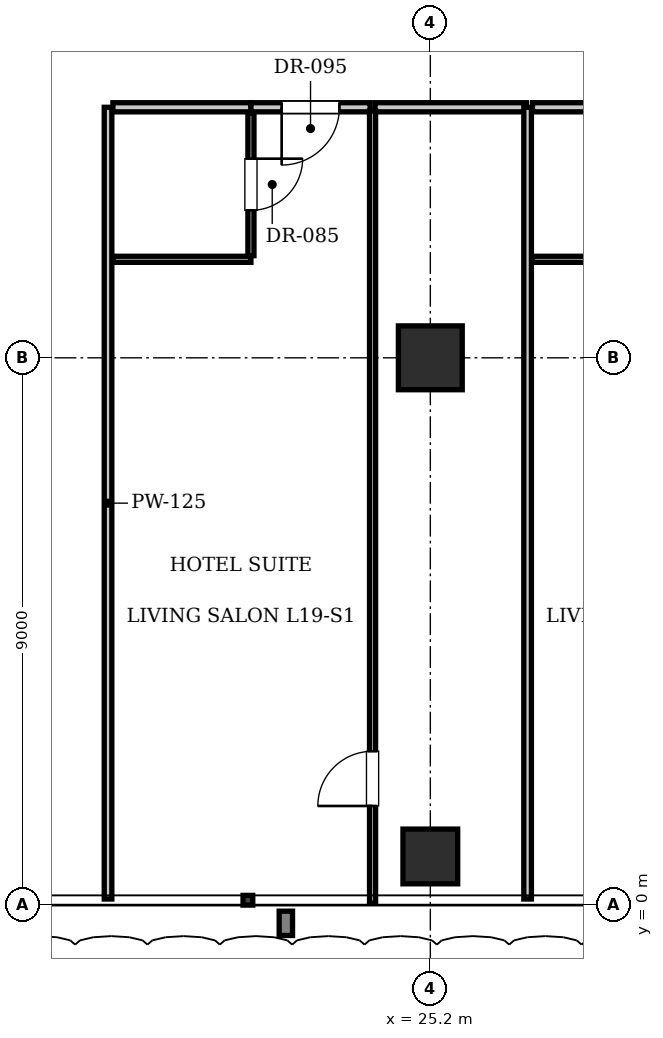
"""IFC4 building model, lengths in metres.
Left out: names, types, materials, properties, quantities, classifications, styles, units other than length and angle.
Written with IfcOpenShell. Run it as: python <this file> out.ifc"""

import sys

from ifc_helpers import new_model, si_unit, direction, frame, frame_2d, origin, origin_2d, place, context, subcontext, project, spatial, rectangle, extrude, element, fill, save


model = new_model("IFC4")
c1 = context("Model", 3, precision=1e-05, world=origin(), true_north=direction((0.0, 1.0)))
c2 = subcontext(c1, "Body", "Model", "MODEL_VIEW")
j1 = project(units=[si_unit("LENGTHUNIT", "METRE"), si_unit("PLANEANGLEUNIT", "RADIAN")], contexts=[c1])
p1 = place(None, origin())
s1 = spatial("IfcSite", under=j1, at=p1, CompositionType="ELEMENT")
p2 = place(p1, origin())
s2 = spatial("IfcBuilding", under=s1, at=p2, CompositionType="ELEMENT")
p3 = place(p2, frame((0.0, 0.0, 80.85)))
s3 = spatial("IfcBuildingStorey", under=s2, at=p3, CompositionType="ELEMENT", Elevation=80.85)
p4 = place(p3, frame((25.2, 9.0, 0.0), z_axis=(0.0, 0.0, 1.0), x_axis=(1.0, 0.0, 0.0)))
e1 = element("IfcColumn", 1, at=p4, inside=s3, PredefinedType="COLUMN", context=c2, shape_type="SweptSolid", body=[
    extrude(rectangle(XDim=1.05, YDim=1.05, at=origin_2d()), origin(), (0.0, 0.0, 1.0), 3.85),
])
p5 = place(p3, frame((25.2, 0.8, 0.0), z_axis=(0.0, 0.0, 1.0), x_axis=(1.0, 0.0, 0.0)))
e2 = element("IfcColumn", 2, at=p5, inside=s3, PredefinedType="COLUMN", context=c2, shape_type="SweptSolid", body=[
    extrude(rectangle(XDim=0.9, YDim=0.9, at=origin_2d()), origin(), (0.0, 0.0, 1.0), 3.85),
])
p6 = place(p3, frame((19.9, 0.1, 0.0), z_axis=(0.0, 0.0, 1.0), x_axis=(0.0, 1.0, 0.0)))
e3 = element("IfcWall", 3, at=p6, inside=s3, PredefinedType="PARTITIONING", context=c2, shape_type="SweptSolid", body=[
    extrude(rectangle(XDim=13.02, YDim=0.125, at=frame_2d((6.51, 0.0))), origin(), (0.0, 0.0, 1.0), 3.61),
])
p7 = place(p3, frame((19.98, 13.12, 0.0), z_axis=(0.0, 0.0, 1.0), x_axis=(1.0, 0.0, 0.0)))
e4 = element("IfcWall", 4, at=p7, inside=s3, PredefinedType="PARTITIONING", context=c2, shape_type="SweptSolid", body=[
    extrude(rectangle(XDim=2.27, YDim=0.15, at=frame_2d((1.135, 0.0))), origin(), (0.0, 0.0, 1.0), 3.61),
])
p8 = place(p3, frame((19.98, 10.62, 0.0), z_axis=(0.0, 0.0, 1.0), x_axis=(1.0, 0.0, 0.0)))
e5 = element("IfcWall", 5, at=p8, inside=s3, PredefinedType="PARTITIONING", context=c2, shape_type="SweptSolid", body=[
    extrude(rectangle(XDim=2.27, YDim=0.1, at=frame_2d((1.135, 0.0))), origin(), (0.0, 0.0, 1.0), 3.61),
])
p9 = place(p3, frame((22.25, 10.68, 0.0), z_axis=(0.0, 0.0, 1.0), x_axis=(0.0, 1.0, 0.0)))
e6 = element("IfcWall", 6, at=p9, inside=s3, PredefinedType="PARTITIONING", context=c2, shape_type="SweptSolid", body=[
    extrude(rectangle(XDim=2.34, YDim=0.1, at=frame_2d((1.17, 0.0))), origin(), (0.0, 0.0, 1.0), 3.61),
])
p10 = place(p9, frame((0.745, 0.0, 0.0)))
e7 = element("IfcOpeningElement", 7, at=p10, cuts=e6, PredefinedType="OPENING", context=c2, shape_type="SweptSolid", body=[
    extrude(rectangle(XDim=0.85, YDim=2.1, at=frame_2d((0.425, 1.05))), frame((0.0, 0.06, 0.0), z_axis=(0.0, -1.0, 0.0), x_axis=(1.0, 0.0, 0.0)), (0.0, 0.0, 1.0), 0.12),
])
p11 = place(p3, frame((22.25, 13.12, 0.0), z_axis=(0.0, 0.0, 1.0), x_axis=(1.0, 0.0, 0.0)))
e8 = element("IfcWall", 8, at=p11, inside=s3, PredefinedType="PARTITIONING", context=c2, shape_type="SweptSolid", body=[
    extrude(rectangle(XDim=1.96, YDim=0.15, at=frame_2d((0.98, 0.0))), origin(), (0.0, 0.0, 1.0), 3.61),
])
p12 = place(p11, frame((0.505, 0.0, 0.0)))
e9 = element("IfcOpeningElement", 9, at=p12, cuts=e8, PredefinedType="OPENING", context=c2, shape_type="SweptSolid", body=[
    extrude(rectangle(XDim=0.95, YDim=2.15, at=frame_2d((0.475, 1.075))), frame((0.0, 0.085, 0.0), z_axis=(0.0, -1.0, 0.0), x_axis=(1.0, 0.0, 0.0)), (0.0, 0.0, 1.0), 0.17),
])
p13 = place(p3, frame((24.29, 13.12, 0.0), z_axis=(0.0, 0.0, 1.0), x_axis=(1.0, 0.0, 0.0)))
e10 = element("IfcWall", 10, at=p13, inside=s3, PredefinedType="PARTITIONING", context=c2, shape_type="SweptSolid", body=[
    extrude(rectangle(XDim=2.49, YDim=0.15, at=frame_2d((1.245, 0.0))), origin(), (0.0, 0.0, 1.0), 3.61),
])
p14 = place(p3, frame((24.25, 0.03, 0.0), z_axis=(0.0, 0.0, 1.0), x_axis=(0.0, 1.0, 0.0)))
e11 = element("IfcWall", 11, at=p14, inside=s3, PredefinedType="PARTITIONING", context=c2, shape_type="SweptSolid", body=[
    extrude(rectangle(XDim=13.03, YDim=0.1, at=frame_2d((6.515, 0.0))), origin(), (0.0, 0.0, 1.0), 3.61),
])
p15 = place(p14, frame((1.6, 0.0, 0.0)))
e12 = element("IfcOpeningElement", 12, at=p15, cuts=e11, PredefinedType="OPENING", context=c2, shape_type="SweptSolid", body=[
    extrude(rectangle(XDim=0.9, YDim=2.1, at=frame_2d((0.45, 1.05))), frame((0.0, 0.06, 0.0), z_axis=(0.0, -1.0, 0.0), x_axis=(1.0, 0.0, 0.0)), (0.0, 0.0, 1.0), 0.12),
])
p16 = place(p3, frame((26.8, 0.1, 0.0), z_axis=(0.0, 0.0, 1.0), x_axis=(0.0, 1.0, 0.0)))
e13 = element("IfcWall", 13, at=p16, inside=s3, PredefinedType="PARTITIONING", context=c2, shape_type="SweptSolid", body=[
    extrude(rectangle(XDim=13.02, YDim=0.125, at=frame_2d((6.51, 0.0))), origin(), (0.0, 0.0, 1.0), 3.61),
])
p17 = place(p3, frame((26.88, 13.12, 0.0), z_axis=(0.0, 0.0, 1.0), x_axis=(1.0, 0.0, 0.0)))
e14 = element("IfcWall", 14, at=p17, inside=s3, PredefinedType="PARTITIONING", context=c2, shape_type="SweptSolid", body=[
    extrude(rectangle(XDim=2.27, YDim=0.15, at=frame_2d((1.135, 0.0))), origin(), (0.0, 0.0, 1.0), 3.61),
])
p18 = place(p3, frame((26.88, 10.62, 0.0), z_axis=(0.0, 0.0, 1.0), x_axis=(1.0, 0.0, 0.0)))
e15 = element("IfcWall", 15, at=p18, inside=s3, PredefinedType="PARTITIONING", context=c2, shape_type="SweptSolid", body=[
    extrude(rectangle(XDim=2.27, YDim=0.1, at=frame_2d((1.135, 0.0))), origin(), (0.0, 0.0, 1.0), 3.61),
])
p19 = place(p10, frame((0.85, 0.0, 0.0), z_axis=(0.0, 0.0, 1.0), x_axis=(-1.0, 0.0, 0.0)))
e16 = element("IfcDoor", 16, at=p19, inside=s3, OperationType="SINGLE_SWING_LEFT", PredefinedType="DOOR", context=c2, shape_type="SweptSolid", body=[
    extrude(rectangle(XDim=0.85, YDim=2.1, at=frame_2d((0.425, 1.05))), frame((0.0, 0.025, 0.0), z_axis=(0.0, -1.0, 0.0), x_axis=(1.0, 0.0, 0.0)), (0.0, 0.0, 1.0), 0.05),
])
fill(e7, e16)
p20 = place(p12, frame((0.95, 0.0, 0.0), z_axis=(0.0, 0.0, 1.0), x_axis=(-1.0, 0.0, 0.0)))
e17 = element("IfcDoor", 17, at=p20, inside=s3, OperationType="SINGLE_SWING_RIGHT", PredefinedType="DOOR", context=c2, shape_type="SweptSolid", body=[
    extrude(rectangle(XDim=0.95, YDim=2.15, at=frame_2d((0.475, 1.075))), frame((0.0, 0.025, 0.0), z_axis=(0.0, -1.0, 0.0), x_axis=(1.0, 0.0, 0.0)), (0.0, 0.0, 1.0), 0.05),
])
fill(e9, e17)
p21 = place(p15, origin())
e18 = element("IfcDoor", 18, at=p21, inside=s3, OperationType="SINGLE_SWING_LEFT", PredefinedType="DOOR", context=c2, shape_type="SweptSolid", body=[
    extrude(rectangle(XDim=0.9, YDim=2.1, at=frame_2d((0.45, 1.05))), frame((0.0, 0.025, 0.0), z_axis=(0.0, -1.0, 0.0), x_axis=(1.0, 0.0, 0.0)), (0.0, 0.0, 1.0), 0.05),
])
fill(e12, e18)
save(model, sys.argv[1])
